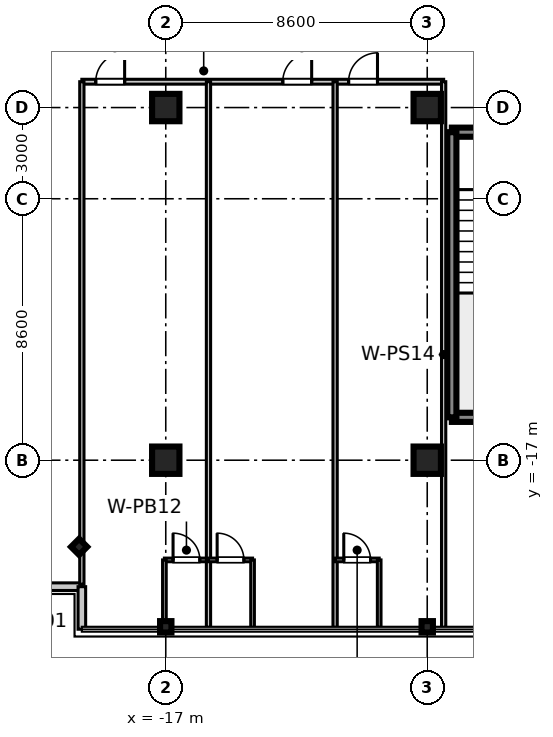
"""IFC4 building model, lengths in metres.
Left out: names, types, materials, properties, quantities, classifications, styles, units other than length and angle.
Written with IfcOpenShell. Run it as: python <this file> out.ifc"""

import sys

from ifc_helpers import new_model, si_unit, direction, frame, frame_2d, origin, origin_2d, place, context, subcontext, project, spatial, rectangle, i_section, extrude, source, transform, mapped, element, fill, save


model = new_model("IFC4")
c1 = context("Model", 3, precision=1e-05, world=origin(), true_north=direction((0.0, 1.0)))
c2 = subcontext(c1, "Body", "Model", "MODEL_VIEW")
j1 = project(units=[si_unit("LENGTHUNIT", "METRE"), si_unit("PLANEANGLEUNIT", "RADIAN")], contexts=[c1])
p1 = place(None, origin())
s1 = spatial("IfcSite", under=j1, at=p1, CompositionType="ELEMENT")
p2 = place(p1, origin())
s2 = spatial("IfcBuilding", under=s1, at=p2, CompositionType="ELEMENT")
p3 = place(p2, frame((0.0, 0.0, 319.55)))
s3 = spatial("IfcBuildingStorey", under=s2, at=p3, CompositionType="ELEMENT", Elevation=319.55)
m1 = source(origin(), c2, "Body", "SweptSolid", [
    extrude(rectangle(XDim=0.9, YDim=0.9, at=origin_2d()), origin(), (0.0, 0.0, 1.0), 3.755),
])
for number, where, z_axis, x_axis in (
    (1, (-17.0, -17.0, 0.0), (0.0, 0.0, 1.0), (1.0, 0.0, 0.0)),
    (2, (-17.0, -5.4, 0.0), (0.0, 0.0, 1.0), (1.0, 0.0, 0.0)),
    (3, (-8.4, -17.0, 0.0), (0.0, 0.0, 1.0), (1.0, 0.0, 0.0)),
    (4, (-8.4, -5.4, 0.0), (0.0, 0.0, 1.0), (1.0, 0.0, 0.0)),
):
    element("IfcColumn", number, at=place(p3, frame(where, z_axis=z_axis, x_axis=x_axis)), inside=s3, PredefinedType="COLUMN", context=c2, shape_type="MappedRepresentation", body=[
        mapped(m1, transform((0.0, 0.0, 0.0), scale=1.0)),
    ])
m2 = source(origin(), c2, "Body", "SweptSolid", [
    extrude(i_section(OverallWidth=0.374, OverallDepth=0.374, WebThickness=0.014, FlangeThickness=0.023, at=origin_2d()), origin(), (0.0, 0.0, 1.0), 3.755),
])
for number, where, z_axis, x_axis in (
    (5, (-17.0, -22.48, 0.0), (0.0, 0.0, 1.0), (0.0, 1.0, 0.0)),
    (6, (-8.4, -22.48, 0.0), (0.0, 0.0, 1.0), (0.0, 1.0, 0.0)),
    (7, (-19.85, -19.85, 0.0), (0.0, 0.0, 1.0), (0.707, 0.707, 0.0)),
):
    element("IfcColumn", number, at=place(p3, frame(where, z_axis=z_axis, x_axis=x_axis)), inside=s3, PredefinedType="COLUMN", context=c2, shape_type="MappedRepresentation", body=[
        mapped(m2, transform((0.0, 0.0, 0.0), scale=1.0)),
    ])
m3 = source(origin(), c2, "Body", "SweptSolid", [
    extrude(rectangle(XDim=3.98, YDim=0.3, at=frame_2d((1.99, 0.0))), origin(), (0.0, 0.0, 1.0), 3.5),
])
p4 = place(p3, frame((-7.59, -15.59, 0.0), z_axis=(0.0, 0.0, 1.0), x_axis=(1.0, 0.0, 0.0)))
e8 = element("IfcWall", 8, at=p4, inside=s3, PredefinedType="SHEAR", context=c2, shape_type="MappedRepresentation", body=[
    mapped(m3, transform((0.0, 0.0, 0.0), scale=1.0)),
])
p5 = place(p3, frame((-7.59, -6.21, 0.0), z_axis=(0.0, 0.0, 1.0), x_axis=(1.0, 0.0, 0.0)))
e9 = element("IfcWall", 9, at=p5, inside=s3, PredefinedType="SHEAR", context=c2, shape_type="MappedRepresentation", body=[
    mapped(m3, transform((0.0, 0.0, 0.0), scale=1.0)),
])
p6 = place(p5, frame((1.44, 0.0, 0.0)))
e10 = element("IfcOpeningElement", 10, at=p6, cuts=e9, PredefinedType="OPENING", context=c2, shape_type="SweptSolid", body=[
    extrude(rectangle(XDim=1.1, YDim=2.15, at=frame_2d((0.55, 1.075))), frame((0.0, 0.16, 0.0), z_axis=(0.0, -1.0, 0.0), x_axis=(1.0, 0.0, 0.0)), (0.0, 0.0, 1.0), 0.32),
])
m4 = source(origin(), c2, "Body", "SweptSolid", [
    extrude(rectangle(XDim=9.38, YDim=0.3, at=frame_2d((4.69, 0.0))), origin(), (0.0, 0.0, 1.0), 3.5),
])
p7 = place(p3, frame((-7.59, -15.59, 0.0), z_axis=(0.0, 0.0, 1.0), x_axis=(0.0, 1.0, 0.0)))
e11 = element("IfcWall", 11, at=p7, inside=s3, PredefinedType="SHEAR", context=c2, shape_type="MappedRepresentation", body=[
    mapped(m4, transform((0.0, 0.0, 0.0), scale=1.0)),
])
m5 = source(origin(), c2, "Body", "SweptSolid", [
    extrude(rectangle(XDim=1.4, YDim=0.25, at=frame_2d((0.7, 0.0))), origin(), (0.0, 0.0, 1.0), 3.5),
])
p8 = place(p3, frame((-21.16, -21.16, 0.0), z_axis=(0.0, 0.0, 1.0), x_axis=(1.0, 0.0, 0.0)))
e12 = element("IfcWall", 12, at=p8, inside=s3, PredefinedType="STANDARD", context=c2, shape_type="MappedRepresentation", body=[
    mapped(m5, transform((0.0, 0.0, 0.0), scale=1.0)),
])
m6 = source(origin(), c2, "Body", "SweptSolid", [
    extrude(rectangle(XDim=1.4, YDim=0.25, at=frame_2d((0.7, 0.0))), origin(), (0.0, 0.0, 1.0), 3.5),
])
p9 = place(p3, frame((-19.76, -22.56, 0.0), z_axis=(0.0, 0.0, 1.0), x_axis=(0.0, 1.0, 0.0)))
e13 = element("IfcWall", 13, at=p9, inside=s3, PredefinedType="STANDARD", context=c2, shape_type="MappedRepresentation", body=[
    mapped(m6, transform((0.0, 0.0, 0.0), scale=1.0)),
])
m7 = source(origin(), c2, "Body", "SweptSolid", [
    extrude(rectangle(XDim=11.9, YDim=0.16, at=frame_2d((5.95, 0.0))), origin(), (0.0, 0.0, 1.0), 2.84),
])
p10 = place(p3, frame((-19.76, -4.55, 0.0), z_axis=(0.0, 0.0, 1.0), x_axis=(1.0, 0.0, 0.0)))
e14 = element("IfcWall", 14, at=p10, inside=s3, PredefinedType="PARTITIONING", context=c2, shape_type="MappedRepresentation", body=[
    mapped(m7, transform((0.0, 0.0, 0.0), scale=1.0)),
])
p11 = place(p10, frame((0.457, 0.0, 0.0)))
e15 = element("IfcOpeningElement", 15, at=p11, cuts=e14, PredefinedType="OPENING", context=c2, shape_type="SweptSolid", body=[
    extrude(rectangle(XDim=0.95, YDim=2.1, at=frame_2d((0.475, 1.05))), frame((0.0, 0.09, 0.0), z_axis=(0.0, -1.0, 0.0), x_axis=(1.0, 0.0, 0.0)), (0.0, 0.0, 1.0), 0.18),
])
p12 = place(p10, frame((6.609, 0.0, 0.0)))
e16 = element("IfcOpeningElement", 16, at=p12, cuts=e14, PredefinedType="OPENING", context=c2, shape_type="SweptSolid", body=[
    extrude(rectangle(XDim=0.95, YDim=2.1, at=frame_2d((0.475, 1.05))), frame((0.0, 0.09, 0.0), z_axis=(0.0, -1.0, 0.0), x_axis=(1.0, 0.0, 0.0)), (0.0, 0.0, 1.0), 0.18),
])
p13 = place(p10, frame((8.774, 0.0, 0.0)))
e17 = element("IfcOpeningElement", 17, at=p13, cuts=e14, PredefinedType="OPENING", context=c2, shape_type="SweptSolid", body=[
    extrude(rectangle(XDim=0.95, YDim=2.1, at=frame_2d((0.475, 1.05))), frame((0.0, 0.09, 0.0), z_axis=(0.0, -1.0, 0.0), x_axis=(1.0, 0.0, 0.0)), (0.0, 0.0, 1.0), 0.18),
])
m8 = source(origin(), c2, "Body", "SweptSolid", [
    extrude(rectangle(XDim=16.53, YDim=0.14, at=frame_2d((8.265, 0.0))), origin(), (0.0, 0.0, 1.0), 2.84),
])
p14 = place(p3, frame((-19.76, -21.08, 0.0), z_axis=(0.0, 0.0, 1.0), x_axis=(0.0, 1.0, 0.0)))
e18 = element("IfcWall", 18, at=p14, inside=s3, PredefinedType="PARTITIONING", context=c2, shape_type="MappedRepresentation", body=[
    mapped(m8, transform((0.0, 0.0, 0.0), scale=1.0)),
])
m9 = source(origin(), c2, "Body", "SweptSolid", [
    extrude(rectangle(XDim=17.95, YDim=0.14, at=frame_2d((8.975, 0.0))), origin(), (0.0, 0.0, 1.0), 2.84),
])
p15 = place(p3, frame((-7.86, -22.5, 0.0), z_axis=(0.0, 0.0, 1.0), x_axis=(0.0, 1.0, 0.0)))
e19 = element("IfcWall", 19, at=p15, inside=s3, PredefinedType="PARTITIONING", context=c2, shape_type="MappedRepresentation", body=[
    mapped(m9, transform((0.0, 0.0, 0.0), scale=1.0)),
])
m10 = source(origin(), c2, "Body", "SweptSolid", [
    extrude(rectangle(XDim=1.45, YDim=0.12, at=frame_2d((0.725, 0.0))), origin(), (0.0, 0.0, 1.0), 2.84),
])
p16 = place(p3, frame((-17.045, -20.28, 0.0), z_axis=(0.0, 0.0, 1.0), x_axis=(1.0, 0.0, 0.0)))
e20 = element("IfcWall", 20, at=p16, inside=s3, PredefinedType="PARTITIONING", context=c2, shape_type="MappedRepresentation", body=[
    mapped(m10, transform((0.0, 0.0, 0.0), scale=1.0)),
])
p17 = place(p16, frame((0.285, 0.0, 0.0)))
e21 = element("IfcOpeningElement", 21, at=p17, cuts=e20, PredefinedType="OPENING", context=c2, shape_type="SweptSolid", body=[
    extrude(rectangle(XDim=0.88, YDim=2.1, at=frame_2d((0.44, 1.05))), frame((0.0, 0.07, 0.0), z_axis=(0.0, -1.0, 0.0), x_axis=(1.0, 0.0, 0.0)), (0.0, 0.0, 1.0), 0.14),
])
m11 = source(origin(), c2, "Body", "SweptSolid", [
    extrude(rectangle(XDim=2.22, YDim=0.12, at=frame_2d((1.11, 0.0))), origin(), (0.0, 0.0, 1.0), 2.84),
])
p18 = place(p3, frame((-17.045, -22.5, 0.0), z_axis=(0.0, 0.0, 1.0), x_axis=(0.0, 1.0, 0.0)))
e22 = element("IfcWall", 22, at=p18, inside=s3, PredefinedType="PARTITIONING", context=c2, shape_type="MappedRepresentation", body=[
    mapped(m11, transform((0.0, 0.0, 0.0), scale=1.0)),
])
p19 = place(p3, frame((-15.595, -22.5, 0.0), z_axis=(0.0, 0.0, 1.0), x_axis=(0.0, 1.0, 0.0)))
e23 = element("IfcWall", 23, at=p19, inside=s3, PredefinedType="PARTITIONING", context=c2, shape_type="MappedRepresentation", body=[
    mapped(m9, transform((0.0, 0.0, 0.0), scale=1.0)),
])
p20 = place(p3, frame((-15.595, -20.28, 0.0), z_axis=(0.0, 0.0, 1.0), x_axis=(1.0, 0.0, 0.0)))
e24 = element("IfcWall", 24, at=p20, inside=s3, PredefinedType="PARTITIONING", context=c2, shape_type="MappedRepresentation", body=[
    mapped(m10, transform((0.0, 0.0, 0.0), scale=1.0)),
])
p21 = place(p20, frame((0.285, 0.0, 0.0)))
e25 = element("IfcOpeningElement", 25, at=p21, cuts=e24, PredefinedType="OPENING", context=c2, shape_type="SweptSolid", body=[
    extrude(rectangle(XDim=0.88, YDim=2.1, at=frame_2d((0.44, 1.05))), frame((0.0, 0.07, 0.0), z_axis=(0.0, -1.0, 0.0), x_axis=(1.0, 0.0, 0.0)), (0.0, 0.0, 1.0), 0.14),
])
p22 = place(p3, frame((-14.145, -22.5, 0.0), z_axis=(0.0, 0.0, 1.0), x_axis=(0.0, 1.0, 0.0)))
e26 = element("IfcWall", 26, at=p22, inside=s3, PredefinedType="PARTITIONING", context=c2, shape_type="MappedRepresentation", body=[
    mapped(m11, transform((0.0, 0.0, 0.0), scale=1.0)),
])
p23 = place(p3, frame((-11.43, -22.5, 0.0), z_axis=(0.0, 0.0, 1.0), x_axis=(0.0, 1.0, 0.0)))
e27 = element("IfcWall", 27, at=p23, inside=s3, PredefinedType="PARTITIONING", context=c2, shape_type="MappedRepresentation", body=[
    mapped(m9, transform((0.0, 0.0, 0.0), scale=1.0)),
])
p24 = place(p3, frame((-11.43, -20.28, 0.0), z_axis=(0.0, 0.0, 1.0), x_axis=(1.0, 0.0, 0.0)))
e28 = element("IfcWall", 28, at=p24, inside=s3, PredefinedType="PARTITIONING", context=c2, shape_type="MappedRepresentation", body=[
    mapped(m10, transform((0.0, 0.0, 0.0), scale=1.0)),
])
p25 = place(p24, frame((0.285, 0.0, 0.0)))
e29 = element("IfcOpeningElement", 29, at=p25, cuts=e28, PredefinedType="OPENING", context=c2, shape_type="SweptSolid", body=[
    extrude(rectangle(XDim=0.88, YDim=2.1, at=frame_2d((0.44, 1.05))), frame((0.0, 0.07, 0.0), z_axis=(0.0, -1.0, 0.0), x_axis=(1.0, 0.0, 0.0)), (0.0, 0.0, 1.0), 0.14),
])
p26 = place(p3, frame((-9.98, -22.5, 0.0), z_axis=(0.0, 0.0, 1.0), x_axis=(0.0, 1.0, 0.0)))
e30 = element("IfcWall", 30, at=p26, inside=s3, PredefinedType="PARTITIONING", context=c2, shape_type="MappedRepresentation", body=[
    mapped(m11, transform((0.0, 0.0, 0.0), scale=1.0)),
])
m12 = source(origin(), c2, "Body", "SweptSolid", [
    extrude(rectangle(XDim=0.88, YDim=2.1, at=frame_2d((0.44, 1.05))), frame((0.0, 0.025, 0.0), z_axis=(0.0, -1.0, 0.0), x_axis=(1.0, 0.0, 0.0)), (0.0, 0.0, 1.0), 0.05),
])
p27 = place(p17, frame((0.88, 0.0, 0.0), z_axis=(0.0, 0.0, 1.0), x_axis=(-1.0, 0.0, 0.0)))
e31 = element("IfcDoor", 31, at=p27, inside=s3, OperationType="SINGLE_SWING_LEFT", PredefinedType="DOOR", context=c2, shape_type="MappedRepresentation", body=[
    mapped(m12, transform((0.0, 0.0, 0.0), scale=1.0)),
])
fill(e21, e31)
m13 = source(origin(), c2, "Body", "SweptSolid", [
    extrude(rectangle(XDim=0.95, YDim=2.1, at=frame_2d((0.475, 1.05))), frame((0.0, 0.025, 0.0), z_axis=(0.0, -1.0, 0.0), x_axis=(1.0, 0.0, 0.0)), (0.0, 0.0, 1.0), 0.05),
])
p28 = place(p11, frame((0.95, 0.0, 0.0), z_axis=(0.0, 0.0, 1.0), x_axis=(-1.0, 0.0, 0.0)))
e32 = element("IfcDoor", 32, at=p28, inside=s3, OperationType="SINGLE_SWING_RIGHT", PredefinedType="DOOR", context=c2, shape_type="MappedRepresentation", body=[
    mapped(m13, transform((0.0, 0.0, 0.0), scale=1.0)),
])
fill(e15, e32)
p29 = place(p21, frame((0.88, 0.0, 0.0), z_axis=(0.0, 0.0, 1.0), x_axis=(-1.0, 0.0, 0.0)))
e33 = element("IfcDoor", 33, at=p29, inside=s3, OperationType="SINGLE_SWING_LEFT", PredefinedType="DOOR", context=c2, shape_type="MappedRepresentation", body=[
    mapped(m12, transform((0.0, 0.0, 0.0), scale=1.0)),
])
fill(e25, e33)
p30 = place(p12, frame((0.95, 0.0, 0.0), z_axis=(0.0, 0.0, 1.0), x_axis=(-1.0, 0.0, 0.0)))
e34 = element("IfcDoor", 34, at=p30, inside=s3, OperationType="SINGLE_SWING_RIGHT", PredefinedType="DOOR", context=c2, shape_type="MappedRepresentation", body=[
    mapped(m13, transform((0.0, 0.0, 0.0), scale=1.0)),
])
fill(e16, e34)
p31 = place(p25, frame((0.88, 0.0, 0.0), z_axis=(0.0, 0.0, 1.0), x_axis=(-1.0, 0.0, 0.0)))
e35 = element("IfcDoor", 35, at=p31, inside=s3, OperationType="SINGLE_SWING_LEFT", PredefinedType="DOOR", context=c2, shape_type="MappedRepresentation", body=[
    mapped(m12, transform((0.0, 0.0, 0.0), scale=1.0)),
])
fill(e29, e35)
p32 = place(p13, frame((0.95, 0.0, 0.0), z_axis=(0.0, 0.0, 1.0), x_axis=(-1.0, 0.0, 0.0)))
e36 = element("IfcDoor", 36, at=p32, inside=s3, OperationType="SINGLE_SWING_RIGHT", PredefinedType="DOOR", context=c2, shape_type="MappedRepresentation", body=[
    mapped(m13, transform((0.0, 0.0, 0.0), scale=1.0)),
])
fill(e17, e36)
save(model, sys.argv[1])
